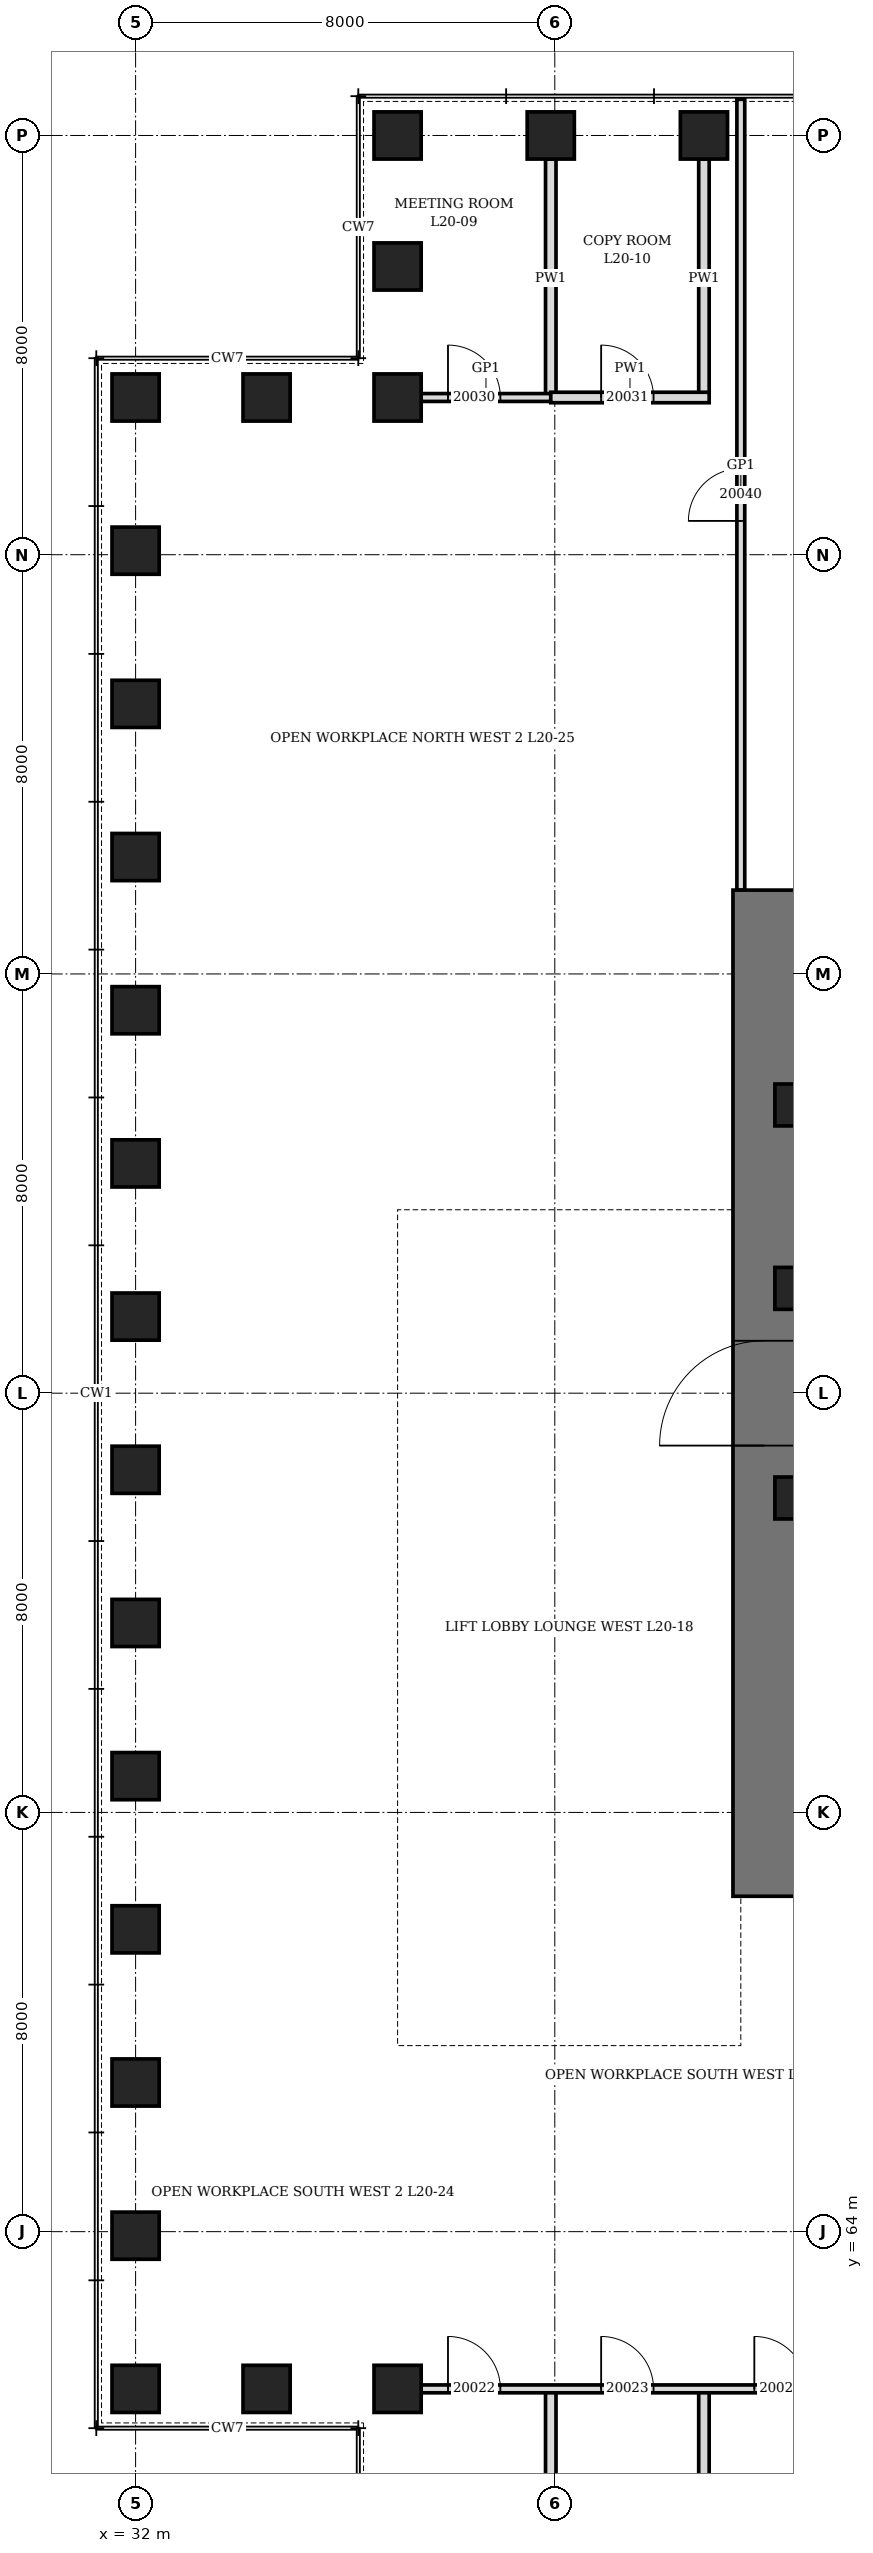
"""IFC4 building model, lengths in metres.
Left out: names, types, materials, properties, quantities, classifications, styles, units other than length and angle.
Written with IfcOpenShell. Run it as: python <this file> out.ifc"""

import sys

from ifc_helpers import new_model, si_unit, direction, frame, frame_2d, origin, origin_2d, place, context, subcontext, project, spatial, rectangle, hollow_rectangle, extrude, element, fill, save


model = new_model("IFC4")
c1 = context("Model", 3, precision=1e-05, world=origin(), true_north=direction((0.0, 1.0)))
c2 = subcontext(c1, "Body", "Model", "MODEL_VIEW")
j1 = project(units=[si_unit("LENGTHUNIT", "METRE"), si_unit("PLANEANGLEUNIT", "RADIAN")], contexts=[c1])
p1 = place(None, origin())
s1 = spatial("IfcSite", under=j1, at=p1, CompositionType="ELEMENT")
p2 = place(p1, origin())
s2 = spatial("IfcBuilding", under=s1, at=p2, CompositionType="ELEMENT")
p3 = place(p2, frame((0.0, 0.0, 93.7)))
s3 = spatial("IfcBuildingStorey", under=s2, at=p3, CompositionType="ELEMENT", Elevation=93.7)
for number, where, z_axis, x_axis in (
    (1, (42.846, 104.0, 0.0), (0.0, 0.0, 1.0), (1.0, 0.0, 0.0)),
    (2, (39.923, 104.0, 0.0), (0.0, 0.0, 1.0), (1.0, 0.0, 0.0)),
    (3, (37.0, 104.0, 0.0), (0.0, 0.0, 1.0), (0.0, 1.0, 0.0)),
    (4, (37.0, 101.5, 0.0), (0.0, 0.0, 1.0), (0.0, 1.0, 0.0)),
    (5, (37.0, 99.0, 0.0), (0.0, 0.0, 1.0), (1.0, 0.0, 0.0)),
    (6, (34.5, 99.0, 0.0), (0.0, 0.0, 1.0), (1.0, 0.0, 0.0)),
    (7, (32.0, 99.0, 0.0), (0.0, 0.0, 1.0), (0.0, 1.0, 0.0)),
    (8, (32.0, 96.077, 0.0), (0.0, 0.0, 1.0), (0.0, 1.0, 0.0)),
    (9, (32.0, 93.154, 0.0), (0.0, 0.0, 1.0), (0.0, 1.0, 0.0)),
    (10, (32.0, 90.231, 0.0), (0.0, 0.0, 1.0), (0.0, 1.0, 0.0)),
    (11, (32.0, 87.308, 0.0), (0.0, 0.0, 1.0), (0.0, 1.0, 0.0)),
    (12, (32.0, 84.385, 0.0), (0.0, 0.0, 1.0), (0.0, 1.0, 0.0)),
    (13, (32.0, 81.461, 0.0), (0.0, 0.0, 1.0), (0.0, 1.0, 0.0)),
    (14, (32.0, 78.539, 0.0), (0.0, 0.0, 1.0), (0.0, 1.0, 0.0)),
    (15, (32.0, 75.615, 0.0), (0.0, 0.0, 1.0), (0.0, 1.0, 0.0)),
    (16, (32.0, 72.692, 0.0), (0.0, 0.0, 1.0), (0.0, 1.0, 0.0)),
    (17, (32.0, 69.769, 0.0), (0.0, 0.0, 1.0), (0.0, 1.0, 0.0)),
    (18, (32.0, 66.846, 0.0), (0.0, 0.0, 1.0), (0.0, 1.0, 0.0)),
    (19, (32.0, 63.923, 0.0), (0.0, 0.0, 1.0), (0.0, 1.0, 0.0)),
    (20, (32.0, 61.0, 0.0), (0.0, 0.0, 1.0), (1.0, 0.0, 0.0)),
    (21, (34.5, 61.0, 0.0), (0.0, 0.0, 1.0), (1.0, 0.0, 0.0)),
    (22, (37.0, 61.0, 0.0), (0.0, 0.0, 1.0), (0.0, 1.0, 0.0)),
):
    element("IfcColumn", number, at=place(p3, frame(where, z_axis=z_axis, x_axis=x_axis)), inside=s3, PredefinedType="COLUMN", context=c2, shape_type="SweptSolid", body=[
        extrude(hollow_rectangle(XDim=0.9, YDim=0.9, WallThickness=0.12, at=origin_2d()), origin(), (0.0, 0.0, 1.0), 4.2),
    ])
p4 = place(p3, frame((44.0, 70.4, 0.0), z_axis=(0.0, 0.0, 1.0), x_axis=(0.0, 1.0, 0.0)))
e23 = element("IfcWall", 23, at=p4, inside=s3, PredefinedType="SHEAR", context=c2, shape_type="SweptSolid", body=[
    extrude(rectangle(XDim=19.2, YDim=1.2, at=frame_2d((9.6, 0.0))), origin(), (0.0, 0.0, 1.0), 4.2),
])
p5 = place(p4, frame((8.6, 0.0, 0.0)))
e24 = element("IfcOpeningElement", 24, at=p5, cuts=e23, PredefinedType="OPENING", context=c2, shape_type="SweptSolid", body=[
    extrude(rectangle(XDim=2.0, YDim=2.4, at=frame_2d((1.0, 1.2))), frame((0.0, 0.61, 0.0), z_axis=(0.0, -1.0, 0.0), x_axis=(1.0, 0.0, 0.0)), (0.0, 0.0, 1.0), 1.22),
])
for number, where, z_axis, x_axis in (
    (25, (44.6, 78.0, 0.0), (0.0, 0.0, 1.0), (1.0, 0.0, 0.0)),
    (26, (44.6, 82.0, 0.0), (0.0, 0.0, 1.0), (1.0, 0.0, 0.0)),
    (27, (44.6, 85.5, 0.0), (0.0, 0.0, 1.0), (1.0, 0.0, 0.0)),
):
    element("IfcColumn", number, at=place(p3, frame(where, z_axis=z_axis, x_axis=x_axis)), inside=s3, PredefinedType="COLUMN", context=c2, shape_type="SweptSolid", body=[
        extrude(hollow_rectangle(XDim=0.8, YDim=0.8, WallThickness=0.1, at=origin_2d()), origin(), (0.0, 0.0, 1.0), 4.2),
    ])
p6 = place(p3, frame((39.923, 56.45, 0.0), z_axis=(0.0, 0.0, 1.0), x_axis=(0.0, 1.0, 0.0)))
e28 = element("IfcWall", 28, at=p6, inside=s3, PredefinedType="PARTITIONING", context=c2, shape_type="SweptSolid", body=[
    extrude(rectangle(XDim=4.55, YDim=0.2, at=frame_2d((2.275, 0.0))), origin(), (0.0, 0.0, 1.0), 3.428),
])
p7 = place(p3, frame((42.846, 56.45, 0.0), z_axis=(0.0, 0.0, 1.0), x_axis=(0.0, 1.0, 0.0)))
e29 = element("IfcWall", 29, at=p7, inside=s3, PredefinedType="PARTITIONING", context=c2, shape_type="SweptSolid", body=[
    extrude(rectangle(XDim=4.55, YDim=0.2, at=frame_2d((2.275, 0.0))), origin(), (0.0, 0.0, 1.0), 3.278),
])
p8 = place(p3, frame((39.923, 99.0, 0.0), z_axis=(0.0, 0.0, 1.0), x_axis=(0.0, 1.0, 0.0)))
e30 = element("IfcWall", 30, at=p8, inside=s3, PredefinedType="PARTITIONING", context=c2, shape_type="SweptSolid", body=[
    extrude(rectangle(XDim=4.55, YDim=0.2, at=frame_2d((2.275, 0.0))), origin(), (0.0, 0.0, 1.0), 3.428),
])
p9 = place(p3, frame((42.846, 99.0, 0.0), z_axis=(0.0, 0.0, 1.0), x_axis=(0.0, 1.0, 0.0)))
e31 = element("IfcWall", 31, at=p9, inside=s3, PredefinedType="PARTITIONING", context=c2, shape_type="SweptSolid", body=[
    extrude(rectangle(XDim=4.55, YDim=0.2, at=frame_2d((2.275, 0.0))), origin(), (0.0, 0.0, 1.0), 3.278),
])
p10 = place(p3, frame((37.45, 61.0, 0.0), z_axis=(0.0, 0.0, 1.0), x_axis=(1.0, 0.0, 0.0)))
e32 = element("IfcWall", 32, at=p10, inside=s3, PredefinedType="PARTITIONING", context=c2, shape_type="SweptSolid", body=[
    extrude(rectangle(XDim=17.188, YDim=0.15, at=frame_2d((8.594, 0.0))), origin(), (0.0, 0.0, 1.0), 4.04),
])
p11 = place(p10, frame((0.511, 0.0, 0.0)))
e33 = element("IfcOpeningElement", 33, at=p11, cuts=e32, PredefinedType="OPENING", context=c2, shape_type="SweptSolid", body=[
    extrude(rectangle(XDim=1.0, YDim=2.4, at=frame_2d((0.5, 1.2))), frame((0.0, 0.085, 0.0), z_axis=(0.0, -1.0, 0.0), x_axis=(1.0, 0.0, 0.0)), (0.0, 0.0, 1.0), 0.17),
])
p12 = place(p10, frame((3.435, 0.0, 0.0)))
e34 = element("IfcOpeningElement", 34, at=p12, cuts=e32, PredefinedType="OPENING", context=c2, shape_type="SweptSolid", body=[
    extrude(rectangle(XDim=1.0, YDim=2.1, at=frame_2d((0.5, 1.05))), frame((0.0, 0.085, 0.0), z_axis=(0.0, -1.0, 0.0), x_axis=(1.0, 0.0, 0.0)), (0.0, 0.0, 1.0), 0.17),
])
p13 = place(p10, frame((6.358, 0.0, 0.0)))
e35 = element("IfcOpeningElement", 35, at=p13, cuts=e32, PredefinedType="OPENING", context=c2, shape_type="SweptSolid", body=[
    extrude(rectangle(XDim=1.0, YDim=2.1, at=frame_2d((0.5, 1.05))), frame((0.0, 0.085, 0.0), z_axis=(0.0, -1.0, 0.0), x_axis=(1.0, 0.0, 0.0)), (0.0, 0.0, 1.0), 0.17),
])
p14 = place(p10, frame((9.281, 0.0, 0.0)))
e36 = element("IfcOpeningElement", 36, at=p14, cuts=e32, PredefinedType="OPENING", context=c2, shape_type="SweptSolid", body=[
    extrude(rectangle(XDim=1.0, YDim=2.1, at=frame_2d((0.5, 1.05))), frame((0.0, 0.085, 0.0), z_axis=(0.0, -1.0, 0.0), x_axis=(1.0, 0.0, 0.0)), (0.0, 0.0, 1.0), 0.17),
])
p15 = place(p10, frame((12.204, 0.0, 0.0)))
e37 = element("IfcOpeningElement", 37, at=p15, cuts=e32, PredefinedType="OPENING", context=c2, shape_type="SweptSolid", body=[
    extrude(rectangle(XDim=1.0, YDim=2.1, at=frame_2d((0.5, 1.05))), frame((0.0, 0.085, 0.0), z_axis=(0.0, -1.0, 0.0), x_axis=(1.0, 0.0, 0.0)), (0.0, 0.0, 1.0), 0.17),
])
p16 = place(p10, frame((15.127, 0.0, 0.0)))
e38 = element("IfcOpeningElement", 38, at=p16, cuts=e32, PredefinedType="OPENING", context=c2, shape_type="SweptSolid", body=[
    extrude(rectangle(XDim=1.0, YDim=2.1, at=frame_2d((0.5, 1.05))), frame((0.0, 0.085, 0.0), z_axis=(0.0, -1.0, 0.0), x_axis=(1.0, 0.0, 0.0)), (0.0, 0.0, 1.0), 0.17),
])
p17 = place(p3, frame((37.45, 99.0, 0.0), z_axis=(0.0, 0.0, 1.0), x_axis=(1.0, 0.0, 0.0)))
e39 = element("IfcWall", 39, at=p17, inside=s3, PredefinedType="PARTITIONING", context=c2, shape_type="SweptSolid", body=[
    extrude(rectangle(XDim=2.473, YDim=0.15, at=frame_2d((1.237, 0.0))), origin(), (0.0, 0.0, 1.0), 4.04),
])
p18 = place(p17, frame((0.511, 0.0, 0.0)))
e40 = element("IfcOpeningElement", 40, at=p18, cuts=e39, PredefinedType="OPENING", context=c2, shape_type="SweptSolid", body=[
    extrude(rectangle(XDim=1.0, YDim=2.4, at=frame_2d((0.5, 1.2))), frame((0.0, 0.085, 0.0), z_axis=(0.0, -1.0, 0.0), x_axis=(1.0, 0.0, 0.0)), (0.0, 0.0, 1.0), 0.17),
])
p19 = place(p3, frame((39.923, 99.0, 0.0), z_axis=(0.0, 0.0, 1.0), x_axis=(1.0, 0.0, 0.0)))
e41 = element("IfcWall", 41, at=p19, inside=s3, PredefinedType="PARTITIONING", context=c2, shape_type="SweptSolid", body=[
    extrude(rectangle(XDim=3.023, YDim=0.2, at=frame_2d((1.511, 0.0))), origin(), (0.0, 0.0, 1.0), 4.04),
])
p20 = place(p19, frame((0.961, 0.0, 0.0)))
e42 = element("IfcOpeningElement", 42, at=p20, cuts=e41, PredefinedType="OPENING", context=c2, shape_type="SweptSolid", body=[
    extrude(rectangle(XDim=1.0, YDim=2.1, at=frame_2d((0.5, 1.05))), frame((0.0, 0.11, 0.0), z_axis=(0.0, -1.0, 0.0), x_axis=(1.0, 0.0, 0.0)), (0.0, 0.0, 1.0), 0.22),
])
p21 = place(p3, frame((43.55, 89.6, 0.0), z_axis=(0.0, 0.0, 1.0), x_axis=(0.0, 1.0, 0.0)))
e43 = element("IfcWall", 43, at=p21, inside=s3, PredefinedType="PARTITIONING", context=c2, shape_type="SweptSolid", body=[
    extrude(rectangle(XDim=15.09, YDim=0.15, at=frame_2d((7.545, 0.0))), origin(), (0.0, 0.0, 1.0), 4.04),
])
p22 = place(p21, frame((7.045, 0.0, 0.0)))
e44 = element("IfcOpeningElement", 44, at=p22, cuts=e43, PredefinedType="OPENING", context=c2, shape_type="SweptSolid", body=[
    extrude(rectangle(XDim=1.0, YDim=2.4, at=frame_2d((0.5, 1.2))), frame((0.0, 0.085, 0.0), z_axis=(0.0, -1.0, 0.0), x_axis=(1.0, 0.0, 0.0)), (0.0, 0.0, 1.0), 0.17),
])
p23 = place(p5, origin())
e45 = element("IfcDoor", 45, at=p23, inside=s3, OperationType="DOUBLE_DOOR_SINGLE_SWING", PredefinedType="DOOR", context=c2, shape_type="SweptSolid", body=[
    extrude(rectangle(XDim=2.0, YDim=2.4, at=frame_2d((1.0, 1.2))), frame((0.0, 0.35, 0.0), z_axis=(0.0, -1.0, 0.0), x_axis=(1.0, 0.0, 0.0)), (0.0, 0.0, 1.0), 0.7),
])
fill(e24, e45)
p24 = place(p11, origin())
e46 = element("IfcDoor", 46, at=p24, inside=s3, OperationType="SINGLE_SWING_RIGHT", PredefinedType="DOOR", context=c2, shape_type="SweptSolid", body=[
    extrude(rectangle(XDim=1.0, YDim=2.4, at=frame_2d((0.5, 1.2))), frame((0.0, 0.075, 0.0), z_axis=(0.0, -1.0, 0.0), x_axis=(1.0, 0.0, 0.0)), (0.0, 0.0, 1.0), 0.149),
])
fill(e33, e46)
p25 = place(p12, origin())
e47 = element("IfcDoor", 47, at=p25, inside=s3, OperationType="SINGLE_SWING_LEFT", PredefinedType="DOOR", context=c2, shape_type="SweptSolid", body=[
    extrude(rectangle(XDim=1.0, YDim=2.1, at=frame_2d((0.5, 1.05))), frame((0.0, 0.075, 0.0), z_axis=(0.0, -1.0, 0.0), x_axis=(1.0, 0.0, 0.0)), (0.0, 0.0, 1.0), 0.149),
])
fill(e34, e47)
p26 = place(p13, origin())
e48 = element("IfcDoor", 48, at=p26, inside=s3, OperationType="SINGLE_SWING_LEFT", PredefinedType="DOOR", context=c2, shape_type="SweptSolid", body=[
    extrude(rectangle(XDim=1.0, YDim=2.1, at=frame_2d((0.5, 1.05))), frame((0.0, 0.075, 0.0), z_axis=(0.0, -1.0, 0.0), x_axis=(1.0, 0.0, 0.0)), (0.0, 0.0, 1.0), 0.149),
])
fill(e35, e48)
p27 = place(p18, origin())
e49 = element("IfcDoor", 49, at=p27, inside=s3, OperationType="SINGLE_SWING_RIGHT", PredefinedType="DOOR", context=c2, shape_type="SweptSolid", body=[
    extrude(rectangle(XDim=1.0, YDim=2.4, at=frame_2d((0.5, 1.2))), frame((0.0, 0.075, 0.0), z_axis=(0.0, -1.0, 0.0), x_axis=(1.0, 0.0, 0.0)), (0.0, 0.0, 1.0), 0.149),
])
fill(e40, e49)
p28 = place(p20, origin())
e50 = element("IfcDoor", 50, at=p28, inside=s3, OperationType="SINGLE_SWING_LEFT", PredefinedType="DOOR", context=c2, shape_type="SweptSolid", body=[
    extrude(rectangle(XDim=1.0, YDim=2.1, at=frame_2d((0.5, 1.05))), frame((0.0, 0.1, 0.0), z_axis=(0.0, -1.0, 0.0), x_axis=(1.0, 0.0, 0.0)), (0.0, 0.0, 1.0), 0.199),
])
fill(e42, e50)
p29 = place(p22, origin())
e51 = element("IfcDoor", 51, at=p29, inside=s3, OperationType="SINGLE_SWING_RIGHT", PredefinedType="DOOR", context=c2, shape_type="SweptSolid", body=[
    extrude(rectangle(XDim=1.0, YDim=2.4, at=frame_2d((0.5, 1.2))), frame((0.0, 0.075, 0.0), z_axis=(0.0, -1.0, 0.0), x_axis=(1.0, 0.0, 0.0)), (0.0, 0.0, 1.0), 0.149),
])
fill(e44, e51)
save(model, sys.argv[1])
